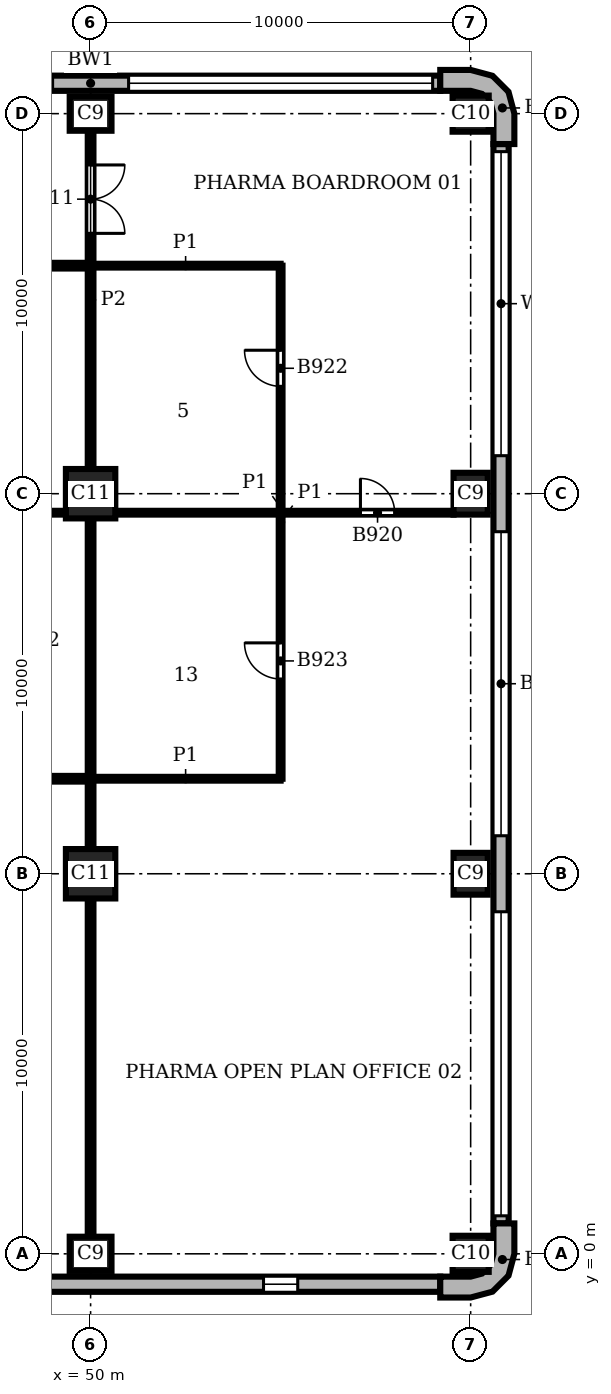
"""IFC4 building model, lengths in metres.
Left out: names, types, materials, properties, quantities, classifications, styles, units other than length and angle.
Written with IfcOpenShell. Run it as: python <this file> out.ifc"""

import sys

from ifc_helpers import new_model, si_unit, direction, frame, frame_2d, origin, origin_2d, place, context, subcontext, project, spatial, polyline, rectangle, outline, extrude, element, fill, save


model = new_model("IFC4")
c1 = context("Model", 3, precision=1e-05, world=origin(), true_north=direction((0.0, 1.0)))
c2 = subcontext(c1, "Body", "Model", "MODEL_VIEW")
j1 = project(units=[si_unit("LENGTHUNIT", "METRE"), si_unit("PLANEANGLEUNIT", "RADIAN")], contexts=[c1])
p1 = place(None, origin())
s1 = spatial("IfcSite", under=j1, at=p1, CompositionType="ELEMENT")
p2 = place(p1, origin())
s2 = spatial("IfcBuilding", under=s1, at=p2, CompositionType="ELEMENT")
p3 = place(p2, frame((0.0, 0.0, 225.3)))
s3 = spatial("IfcBuildingStorey", under=s2, at=p3, CompositionType="ELEMENT", Elevation=225.3)
p4 = place(p3, frame((50.0, 0.0, 0.0), z_axis=(0.0, 0.0, 1.0), x_axis=(1.0, 0.0, 0.0)))
e1 = element("IfcColumn", 1, at=p4, inside=s3, PredefinedType="COLUMN", context=c2, shape_type="SweptSolid", body=[
    extrude(rectangle(XDim=1.1, YDim=0.9, at=origin_2d()), origin(), (0.0, 0.0, 1.0), 3.9),
])
p5 = place(p3, frame((60.0, 0.0, 0.0), z_axis=(0.0, 0.0, 1.0), x_axis=(1.0, 0.0, 0.0)))
e2 = element("IfcColumn", 2, at=p5, inside=s3, PredefinedType="COLUMN", context=c2, shape_type="SweptSolid", body=[
    extrude(rectangle(XDim=0.95, YDim=0.95, at=origin_2d()), origin(), (0.0, 0.0, 1.0), 3.9),
])
for number, where, z_axis, x_axis in (
    (3, (60.0, 10.0, 0.0), (0.0, 0.0, 1.0), (0.0, 1.0, 0.0)),
    (4, (60.0, 20.0, 0.0), (0.0, 0.0, 1.0), (0.0, 1.0, 0.0)),
):
    element("IfcColumn", number, at=place(p3, frame(where, z_axis=z_axis, x_axis=x_axis)), inside=s3, PredefinedType="COLUMN", context=c2, shape_type="SweptSolid", body=[
        extrude(rectangle(XDim=1.1, YDim=0.9, at=origin_2d()), origin(), (0.0, 0.0, 1.0), 3.9),
    ])
p6 = place(p3, frame((60.0, 30.0, 0.0), z_axis=(0.0, 0.0, 1.0), x_axis=(1.0, 0.0, 0.0)))
e5 = element("IfcColumn", 5, at=p6, inside=s3, PredefinedType="COLUMN", context=c2, shape_type="SweptSolid", body=[
    extrude(rectangle(XDim=0.95, YDim=0.95, at=origin_2d()), origin(), (0.0, 0.0, 1.0), 3.9),
])
p7 = place(p3, frame((50.0, 30.0, 0.0), z_axis=(0.0, 0.0, 1.0), x_axis=(1.0, 0.0, 0.0)))
e6 = element("IfcColumn", 6, at=p7, inside=s3, PredefinedType="COLUMN", context=c2, shape_type="SweptSolid", body=[
    extrude(rectangle(XDim=1.1, YDim=0.9, at=origin_2d()), origin(), (0.0, 0.0, 1.0), 3.9),
])
for number, where, z_axis, x_axis in (
    (7, (50.0, 10.0, 0.0), (0.0, 0.0, 1.0), (1.0, 0.0, 0.0)),
    (8, (50.0, 20.0, 0.0), (0.0, 0.0, 1.0), (1.0, 0.0, 0.0)),
):
    element("IfcColumn", number, at=place(p3, frame(where, z_axis=z_axis, x_axis=x_axis)), inside=s3, PredefinedType="COLUMN", context=c2, shape_type="SweptSolid", body=[
        extrude(rectangle(XDim=1.3, YDim=1.3, at=origin_2d()), origin(), (0.0, 0.0, 1.0), 3.9),
    ])
p8 = place(p3, origin())
e9 = element("IfcWall", 9, at=p8, inside=s3, PredefinedType="SOLIDWALL", context=c2, shape_type="SweptSolid", body=[
    extrude(outline(polyline([(59.2, -1.0), (59.2, -1.15), (60.0, -1.15), (60.575, -0.996), (60.996, -0.575), (61.15, 0.0), (61.15, 0.8), (61.0, 0.8), (60.6, 0.8), (60.6, 0.0), (60.52, -0.3), (60.3, -0.52), (60.0, -0.6), (59.2, -0.6), (59.2, -1.0)])), origin(), (0.0, 0.0, 1.0), 3.9),
])
e10 = element("IfcWall", 10, at=p8, inside=s3, PredefinedType="SOLIDWALL", context=c2, shape_type="SweptSolid", body=[
    extrude(outline(polyline([(61.0, 29.2), (61.15, 29.2), (61.15, 30.0), (60.996, 30.575), (60.575, 30.996), (60.0, 31.15), (59.2, 31.15), (59.2, 31.0), (59.2, 30.6), (60.0, 30.6), (60.3, 30.52), (60.52, 30.3), (60.6, 30.0), (60.6, 29.2), (61.0, 29.2)])), origin(), (0.0, 0.0, 1.0), 3.9),
])
p9 = place(p3, frame((20.8, -0.8, 0.0), z_axis=(0.0, 0.0, 1.0), x_axis=(1.0, 0.0, 0.0)))
e11 = element("IfcWall", 11, at=p9, inside=s3, PredefinedType="SOLIDWALL", context=c2, shape_type="SweptSolid", body=[
    extrude(rectangle(XDim=38.4, YDim=0.4, at=frame_2d((19.2, 0.0))), origin(), (0.0, 0.0, 1.0), 3.9),
])
p10 = place(p9, frame((3.75, 0.0, 0.9)))
e12 = element("IfcOpeningElement", 12, at=p10, cuts=e11, PredefinedType="OPENING", context=c2, shape_type="SweptSolid", body=[
    extrude(rectangle(XDim=0.9, YDim=2.35, at=frame_2d((0.45, 1.175))), frame((0.0, 0.21, 0.0), z_axis=(0.0, -1.0, 0.0), x_axis=(1.0, 0.0, 0.0)), (0.0, 0.0, 1.0), 0.42),
])
p11 = place(p9, frame((13.75, 0.0, 0.9)))
e13 = element("IfcOpeningElement", 13, at=p11, cuts=e11, PredefinedType="OPENING", context=c2, shape_type="SweptSolid", body=[
    extrude(rectangle(XDim=0.9, YDim=2.35, at=frame_2d((0.45, 1.175))), frame((0.0, 0.21, 0.0), z_axis=(0.0, -1.0, 0.0), x_axis=(1.0, 0.0, 0.0)), (0.0, 0.0, 1.0), 0.42),
])
p12 = place(p9, frame((23.75, 0.0, 0.9)))
e14 = element("IfcOpeningElement", 14, at=p12, cuts=e11, PredefinedType="OPENING", context=c2, shape_type="SweptSolid", body=[
    extrude(rectangle(XDim=0.9, YDim=2.35, at=frame_2d((0.45, 1.175))), frame((0.0, 0.21, 0.0), z_axis=(0.0, -1.0, 0.0), x_axis=(1.0, 0.0, 0.0)), (0.0, 0.0, 1.0), 0.42),
])
p13 = place(p9, frame((33.75, 0.0, 0.9)))
e15 = element("IfcOpeningElement", 15, at=p13, cuts=e11, PredefinedType="OPENING", context=c2, shape_type="SweptSolid", body=[
    extrude(rectangle(XDim=0.9, YDim=2.35, at=frame_2d((0.45, 1.175))), frame((0.0, 0.21, 0.0), z_axis=(0.0, -1.0, 0.0), x_axis=(1.0, 0.0, 0.0)), (0.0, 0.0, 1.0), 0.42),
])
p14 = place(p3, frame((60.8, 0.8, 0.0), z_axis=(0.0, 0.0, 1.0), x_axis=(0.0, 1.0, 0.0)))
e16 = element("IfcWall", 16, at=p14, inside=s3, PredefinedType="SOLIDWALL", context=c2, shape_type="SweptSolid", body=[
    extrude(rectangle(XDim=28.4, YDim=0.4, at=frame_2d((14.2, 0.0))), origin(), (0.0, 0.0, 1.0), 3.9),
])
p15 = place(p14, frame((0.2, 0.0, 0.9)))
e17 = element("IfcOpeningElement", 17, at=p15, cuts=e16, PredefinedType="OPENING", context=c2, shape_type="SweptSolid", body=[
    extrude(rectangle(XDim=8.0, YDim=2.35, at=frame_2d((4.0, 1.175))), frame((0.0, 0.21, 0.0), z_axis=(0.0, -1.0, 0.0), x_axis=(1.0, 0.0, 0.0)), (0.0, 0.0, 1.0), 0.42),
])
p16 = place(p14, frame((10.2, 0.0, 0.9)))
e18 = element("IfcOpeningElement", 18, at=p16, cuts=e16, PredefinedType="OPENING", context=c2, shape_type="SweptSolid", body=[
    extrude(rectangle(XDim=8.0, YDim=2.35, at=frame_2d((4.0, 1.175))), frame((0.0, 0.21, 0.0), z_axis=(0.0, -1.0, 0.0), x_axis=(1.0, 0.0, 0.0)), (0.0, 0.0, 1.0), 0.42),
])
p17 = place(p14, frame((20.2, 0.0, 0.9)))
e19 = element("IfcOpeningElement", 19, at=p17, cuts=e16, PredefinedType="OPENING", context=c2, shape_type="SweptSolid", body=[
    extrude(rectangle(XDim=8.0, YDim=2.35, at=frame_2d((4.0, 1.175))), frame((0.0, 0.21, 0.0), z_axis=(0.0, -1.0, 0.0), x_axis=(1.0, 0.0, 0.0)), (0.0, 0.0, 1.0), 0.42),
])
p18 = place(p3, frame((59.2, 30.8, 0.0), z_axis=(0.0, 0.0, 1.0), x_axis=(-1.0, 0.0, 0.0)))
e20 = element("IfcWall", 20, at=p18, inside=s3, PredefinedType="SOLIDWALL", context=c2, shape_type="SweptSolid", body=[
    extrude(rectangle(XDim=18.4, YDim=0.4, at=frame_2d((9.2, 0.0))), origin(), (0.0, 0.0, 1.0), 3.9),
])
p19 = place(p18, frame((0.2, 0.0, 0.9)))
e21 = element("IfcOpeningElement", 21, at=p19, cuts=e20, PredefinedType="OPENING", context=c2, shape_type="SweptSolid", body=[
    extrude(rectangle(XDim=8.0, YDim=2.35, at=frame_2d((4.0, 1.175))), frame((0.0, 0.21, 0.0), z_axis=(0.0, -1.0, 0.0), x_axis=(1.0, 0.0, 0.0)), (0.0, 0.0, 1.0), 0.42),
])
p20 = place(p18, frame((10.2, 0.0, 0.9)))
e22 = element("IfcOpeningElement", 22, at=p20, cuts=e20, PredefinedType="OPENING", context=c2, shape_type="SweptSolid", body=[
    extrude(rectangle(XDim=8.0, YDim=2.35, at=frame_2d((4.0, 1.175))), frame((0.0, 0.21, 0.0), z_axis=(0.0, -1.0, 0.0), x_axis=(1.0, 0.0, 0.0)), (0.0, 0.0, 1.0), 0.42),
])
p21 = place(p3, frame((55.0, 12.5, 0.0), z_axis=(0.0, 0.0, 1.0), x_axis=(0.0, 1.0, 0.0)))
e23 = element("IfcWall", 23, at=p21, inside=s3, PredefinedType="PARTITIONING", context=c2, shape_type="SweptSolid", body=[
    extrude(rectangle(XDim=13.5, YDim=0.1, at=frame_2d((6.75, 0.0))), origin(), (0.0, 0.0, 1.0), 3.58),
])
p22 = place(p21, frame((10.325, 0.0, 0.0)))
e24 = element("IfcOpeningElement", 24, at=p22, cuts=e23, PredefinedType="OPENING", context=c2, shape_type="SweptSolid", body=[
    extrude(rectangle(XDim=0.95, YDim=2.1, at=frame_2d((0.475, 1.05))), frame((0.0, 0.06, 0.0), z_axis=(0.0, -1.0, 0.0), x_axis=(1.0, 0.0, 0.0)), (0.0, 0.0, 1.0), 0.12),
])
p23 = place(p21, frame((2.625, 0.0, 0.0)))
e25 = element("IfcOpeningElement", 25, at=p23, cuts=e23, PredefinedType="OPENING", context=c2, shape_type="SweptSolid", body=[
    extrude(rectangle(XDim=0.95, YDim=2.1, at=frame_2d((0.475, 1.05))), frame((0.0, 0.06, 0.0), z_axis=(0.0, -1.0, 0.0), x_axis=(1.0, 0.0, 0.0)), (0.0, 0.0, 1.0), 0.12),
])
p24 = place(p3, frame((50.0, 12.5, 0.0), z_axis=(0.0, 0.0, 1.0), x_axis=(1.0, 0.0, 0.0)))
e26 = element("IfcWall", 26, at=p24, inside=s3, PredefinedType="PARTITIONING", context=c2, shape_type="SweptSolid", body=[
    extrude(rectangle(XDim=5.0, YDim=0.1, at=frame_2d((2.5, 0.0))), origin(), (0.0, 0.0, 1.0), 3.58),
])
p25 = place(p3, frame((40.65, 19.5, 0.0), z_axis=(0.0, 0.0, 1.0), x_axis=(1.0, 0.0, 0.0)))
e27 = element("IfcWall", 27, at=p25, inside=s3, PredefinedType="PARTITIONING", context=c2, shape_type="SweptSolid", body=[
    extrude(rectangle(XDim=8.7, YDim=0.1, at=frame_2d((4.35, 0.0))), origin(), (0.0, 0.0, 1.0), 3.58),
])
p26 = place(p25, frame((4.675, 0.0, 0.0)))
e28 = element("IfcOpeningElement", 28, at=p26, cuts=e27, PredefinedType="OPENING", context=c2, shape_type="SweptSolid", body=[
    extrude(rectangle(XDim=0.95, YDim=2.1, at=frame_2d((0.475, 1.05))), frame((0.0, 0.06, 0.0), z_axis=(0.0, -1.0, 0.0), x_axis=(1.0, 0.0, 0.0)), (0.0, 0.0, 1.0), 0.12),
])
p27 = place(p3, frame((50.65, 19.5, 0.0), z_axis=(0.0, 0.0, 1.0), x_axis=(1.0, 0.0, 0.0)))
e29 = element("IfcWall", 29, at=p27, inside=s3, PredefinedType="PARTITIONING", context=c2, shape_type="SweptSolid", body=[
    extrude(rectangle(XDim=8.9, YDim=0.1, at=frame_2d((4.45, 0.0))), origin(), (0.0, 0.0, 1.0), 3.58),
])
p28 = place(p27, frame((6.45, 0.0, 0.0)))
e30 = element("IfcOpeningElement", 30, at=p28, cuts=e29, PredefinedType="OPENING", context=c2, shape_type="SweptSolid", body=[
    extrude(rectangle(XDim=0.9, YDim=2.1, at=frame_2d((0.45, 1.05))), frame((0.0, 0.06, 0.0), z_axis=(0.0, -1.0, 0.0), x_axis=(1.0, 0.0, 0.0)), (0.0, 0.0, 1.0), 0.12),
])
p29 = place(p3, frame((50.0, 26.0, 0.0), z_axis=(0.0, 0.0, 1.0), x_axis=(1.0, 0.0, 0.0)))
e31 = element("IfcWall", 31, at=p29, inside=s3, PredefinedType="PARTITIONING", context=c2, shape_type="SweptSolid", body=[
    extrude(rectangle(XDim=5.0, YDim=0.1, at=frame_2d((2.5, 0.0))), origin(), (0.0, 0.0, 1.0), 3.58),
])
p30 = place(p3, frame((50.0, 0.45, 0.0), z_axis=(0.0, 0.0, 1.0), x_axis=(0.0, 1.0, 0.0)))
e32 = element("IfcWall", 32, at=p30, inside=s3, PredefinedType="PARTITIONING", context=c2, shape_type="SweptSolid", body=[
    extrude(rectangle(XDim=8.9, YDim=0.15, at=frame_2d((4.45, 0.0))), origin(), (0.0, 0.0, 1.0), 3.58),
])
p31 = place(p3, frame((50.0, 10.65, 0.0), z_axis=(0.0, 0.0, 1.0), x_axis=(0.0, 1.0, 0.0)))
e33 = element("IfcWall", 33, at=p31, inside=s3, PredefinedType="PARTITIONING", context=c2, shape_type="SweptSolid", body=[
    extrude(rectangle(XDim=8.7, YDim=0.15, at=frame_2d((4.35, 0.0))), origin(), (0.0, 0.0, 1.0), 3.58),
])
p32 = place(p3, frame((50.0, 20.65, 0.0), z_axis=(0.0, 0.0, 1.0), x_axis=(0.0, 1.0, 0.0)))
e34 = element("IfcWall", 34, at=p32, inside=s3, PredefinedType="PARTITIONING", context=c2, shape_type="SweptSolid", body=[
    extrude(rectangle(XDim=8.9, YDim=0.15, at=frame_2d((4.45, 0.0))), origin(), (0.0, 0.0, 1.0), 3.58),
])
p33 = place(p32, frame((6.2, 0.0, 0.0)))
e35 = element("IfcOpeningElement", 35, at=p33, cuts=e34, PredefinedType="OPENING", context=c2, shape_type="SweptSolid", body=[
    extrude(rectangle(XDim=1.8, YDim=2.1, at=frame_2d((0.9, 1.05))), frame((0.0, 0.085, 0.0), z_axis=(0.0, -1.0, 0.0), x_axis=(1.0, 0.0, 0.0)), (0.0, 0.0, 1.0), 0.17),
])
p34 = place(p3, frame((33.2, 12.5, 0.0), z_axis=(0.0, 0.0, 1.0), x_axis=(1.0, 0.0, 0.0)))
e36 = element("IfcWall", 36, at=p34, inside=s3, PredefinedType="PARTITIONING", context=c2, shape_type="SweptSolid", body=[
    extrude(rectangle(XDim=16.8, YDim=0.15, at=frame_2d((8.4, 0.0))), origin(), (0.0, 0.0, 1.0), 3.58),
])
p35 = place(p3, frame((33.2, 26.0, 0.0), z_axis=(0.0, 0.0, 1.0), x_axis=(1.0, 0.0, 0.0)))
e37 = element("IfcWall", 37, at=p35, inside=s3, PredefinedType="PARTITIONING", context=c2, shape_type="SweptSolid", body=[
    extrude(rectangle(XDim=16.8, YDim=0.15, at=frame_2d((8.4, 0.0))), origin(), (0.0, 0.0, 1.0), 3.58),
])
p36 = place(p35, frame((9.4, 0.0, 0.0)))
e38 = element("IfcOpeningElement", 38, at=p36, cuts=e37, PredefinedType="OPENING", context=c2, shape_type="SweptSolid", body=[
    extrude(rectangle(XDim=1.0, YDim=2.1, at=frame_2d((0.5, 1.05))), frame((0.0, 0.085, 0.0), z_axis=(0.0, -1.0, 0.0), x_axis=(1.0, 0.0, 0.0)), (0.0, 0.0, 1.0), 0.17),
])
p37 = place(p13, origin())
e39 = element("IfcWindow", 39, at=p37, inside=s3, PartitioningType="SINGLE_PANEL", PredefinedType="WINDOW", context=c2, shape_type="SweptSolid", body=[
    extrude(rectangle(XDim=0.9, YDim=2.35, at=frame_2d((0.45, 1.175))), frame((0.0, 0.16, 0.0), z_axis=(0.0, -1.0, 0.0), x_axis=(1.0, 0.0, 0.0)), (0.0, 0.0, 1.0), 0.06),
])
fill(e15, e39)
p38 = place(p15, origin())
e40 = element("IfcWindow", 40, at=p38, inside=s3, PartitioningType="SINGLE_PANEL", PredefinedType="WINDOW", context=c2, shape_type="SweptSolid", body=[
    extrude(rectangle(XDim=8.0, YDim=2.35, at=frame_2d((4.0, 1.175))), frame((0.0, 0.16, 0.0), z_axis=(0.0, -1.0, 0.0), x_axis=(1.0, 0.0, 0.0)), (0.0, 0.0, 1.0), 0.06),
])
fill(e17, e40)
p39 = place(p16, origin())
e41 = element("IfcWindow", 41, at=p39, inside=s3, PartitioningType="SINGLE_PANEL", PredefinedType="WINDOW", context=c2, shape_type="SweptSolid", body=[
    extrude(rectangle(XDim=8.0, YDim=2.35, at=frame_2d((4.0, 1.175))), frame((0.0, 0.16, 0.0), z_axis=(0.0, -1.0, 0.0), x_axis=(1.0, 0.0, 0.0)), (0.0, 0.0, 1.0), 0.06),
])
fill(e18, e41)
p40 = place(p17, origin())
e42 = element("IfcWindow", 42, at=p40, inside=s3, PartitioningType="SINGLE_PANEL", PredefinedType="WINDOW", context=c2, shape_type="SweptSolid", body=[
    extrude(rectangle(XDim=8.0, YDim=2.35, at=frame_2d((4.0, 1.175))), frame((0.0, 0.16, 0.0), z_axis=(0.0, -1.0, 0.0), x_axis=(1.0, 0.0, 0.0)), (0.0, 0.0, 1.0), 0.06),
])
fill(e19, e42)
p41 = place(p19, origin())
e43 = element("IfcWindow", 43, at=p41, inside=s3, PartitioningType="SINGLE_PANEL", PredefinedType="WINDOW", context=c2, shape_type="SweptSolid", body=[
    extrude(rectangle(XDim=8.0, YDim=2.35, at=frame_2d((4.0, 1.175))), frame((0.0, 0.16, 0.0), z_axis=(0.0, -1.0, 0.0), x_axis=(1.0, 0.0, 0.0)), (0.0, 0.0, 1.0), 0.06),
])
fill(e21, e43)
p42 = place(p33, frame((1.8, 0.0, 0.0), z_axis=(0.0, 0.0, 1.0), x_axis=(-1.0, 0.0, 0.0)))
e44 = element("IfcDoor", 44, at=p42, inside=s3, OperationType="DOUBLE_DOOR_SINGLE_SWING", PredefinedType="DOOR", context=c2, shape_type="SweptSolid", body=[
    extrude(rectangle(XDim=1.8, YDim=2.1, at=frame_2d((0.9, 1.05))), frame((0.0, 0.025, 0.0), z_axis=(0.0, -1.0, 0.0), x_axis=(1.0, 0.0, 0.0)), (0.0, 0.0, 1.0), 0.05),
])
fill(e35, e44)
p43 = place(p28, origin())
e45 = element("IfcDoor", 45, at=p43, inside=s3, OperationType="SINGLE_SWING_LEFT", PredefinedType="DOOR", context=c2, shape_type="SweptSolid", body=[
    extrude(rectangle(XDim=0.9, YDim=2.1, at=frame_2d((0.45, 1.05))), frame((0.0, 0.025, 0.0), z_axis=(0.0, -1.0, 0.0), x_axis=(1.0, 0.0, 0.0)), (0.0, 0.0, 1.0), 0.05),
])
fill(e30, e45)
p44 = place(p22, origin())
e46 = element("IfcDoor", 46, at=p44, inside=s3, OperationType="SINGLE_SWING_RIGHT", PredefinedType="DOOR", context=c2, shape_type="SweptSolid", body=[
    extrude(rectangle(XDim=0.95, YDim=2.1, at=frame_2d((0.475, 1.05))), frame((0.0, 0.025, 0.0), z_axis=(0.0, -1.0, 0.0), x_axis=(1.0, 0.0, 0.0)), (0.0, 0.0, 1.0), 0.05),
])
fill(e24, e46)
p45 = place(p23, origin())
e47 = element("IfcDoor", 47, at=p45, inside=s3, OperationType="SINGLE_SWING_RIGHT", PredefinedType="DOOR", context=c2, shape_type="SweptSolid", body=[
    extrude(rectangle(XDim=0.95, YDim=2.1, at=frame_2d((0.475, 1.05))), frame((0.0, 0.025, 0.0), z_axis=(0.0, -1.0, 0.0), x_axis=(1.0, 0.0, 0.0)), (0.0, 0.0, 1.0), 0.05),
])
fill(e25, e47)
save(model, sys.argv[1])
